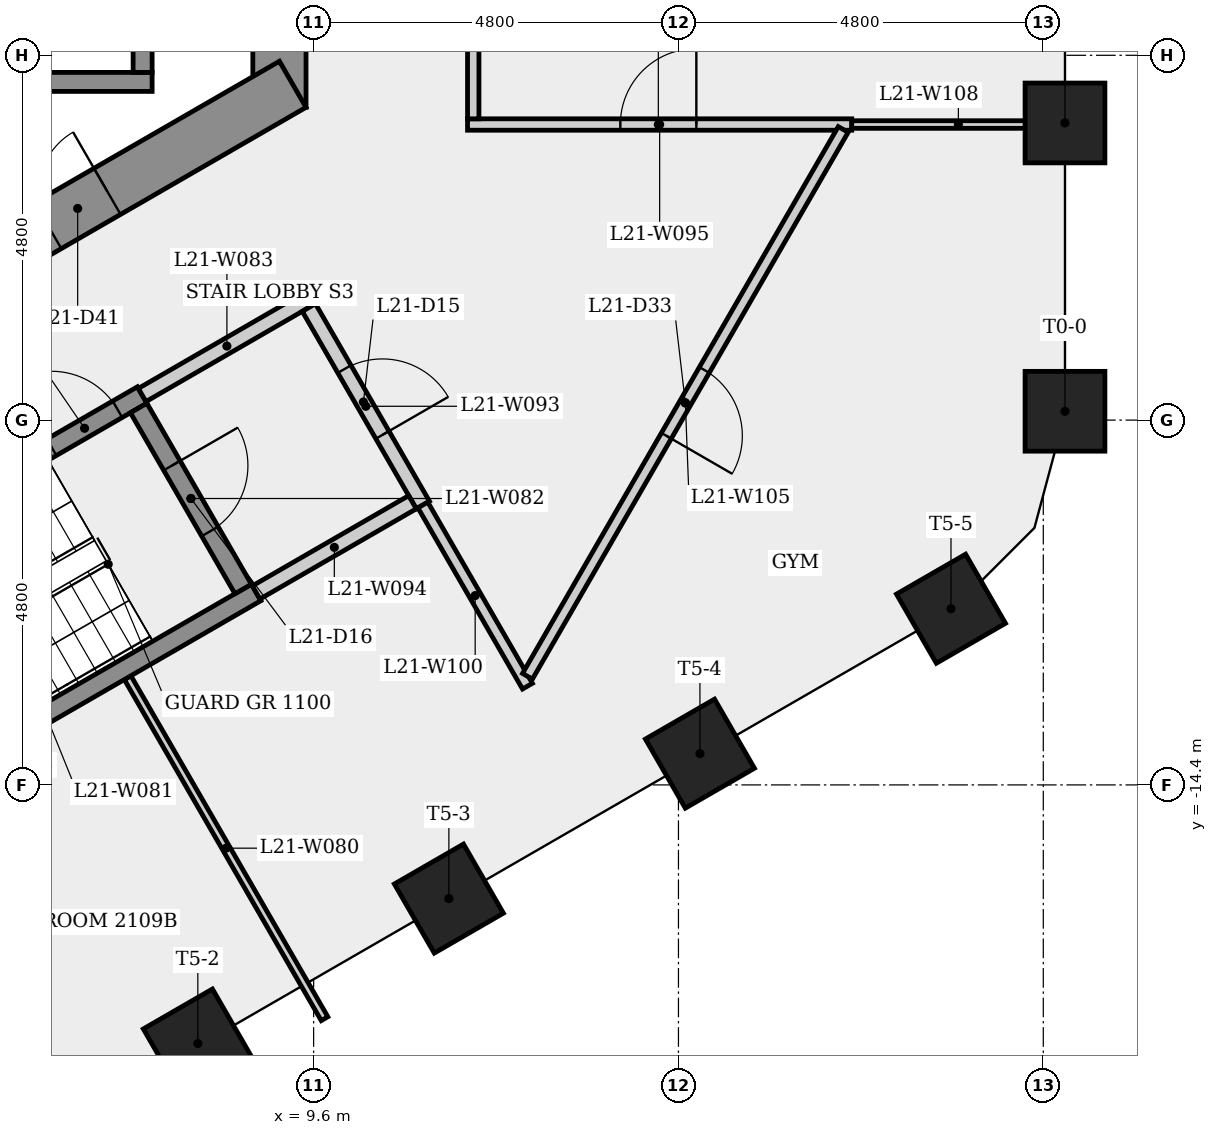
"""IFC4 building model, lengths in metres.
Left out: names, types, materials, properties, quantities, classifications, styles, units other than length and angle.
Written with IfcOpenShell. Run it as: python <this file> out.ifc"""

import sys

from ifc_helpers import new_model, si_unit, direction, frame, frame_2d, origin, origin_2d, place, context, subcontext, project, spatial, rectangle, extrude, element, fill, save


model = new_model("IFC4")
c1 = context("Model", 3, precision=1e-05, world=origin(), true_north=direction((0.0, 1.0)))
c2 = subcontext(c1, "Body", "Model", "MODEL_VIEW")
j1 = project(units=[si_unit("LENGTHUNIT", "METRE"), si_unit("PLANEANGLEUNIT", "RADIAN")], contexts=[c1])
p1 = place(None, origin())
s1 = spatial("IfcSite", under=j1, at=p1, CompositionType="ELEMENT")
p2 = place(p1, origin())
s2 = spatial("IfcBuilding", under=s1, at=p2, CompositionType="ELEMENT")
p3 = place(p2, frame((0.0, 0.0, 83.1)))
s3 = spatial("IfcBuildingStorey", under=s2, at=p3, CompositionType="ELEMENT", Elevation=83.1)
p4 = place(p3, frame((9.15, -5.485, 0.0), z_axis=(0.0, 0.0, 1.0), x_axis=(0.0, 1.0, 0.0)))
e1 = element("IfcWall", 1, at=p4, inside=s3, PredefinedType="SHEAR", context=c2, shape_type="SweptSolid", body=[
    extrude(rectangle(XDim=10.97, YDim=0.7, at=frame_2d((5.485, 0.0))), origin(), (0.0, 0.0, 1.0), 3.4),
])
p5 = place(p4, frame((4.685, 0.0, 0.0)))
e2 = element("IfcOpeningElement", 2, at=p5, cuts=e1, PredefinedType="OPENING", context=c2, shape_type="SweptSolid", body=[
    extrude(rectangle(XDim=1.6, YDim=2.1, at=frame_2d((0.8, 1.05))), frame((0.0, 0.36, 0.0), z_axis=(0.0, -1.0, 0.0), x_axis=(1.0, 0.0, 0.0)), (0.0, 0.0, 1.0), 0.72),
])
p6 = place(p3, frame((-0.175, -10.667, 0.0), z_axis=(0.0, 0.0, 1.0), x_axis=(0.866023993627, 0.500002442456, 0.0)))
e3 = element("IfcWall", 3, at=p6, inside=s3, PredefinedType="SHEAR", context=c2, shape_type="SweptSolid", body=[
    extrude(rectangle(XDim=10.97, YDim=0.7, at=frame_2d((5.485, 0.0))), origin(), (0.0, 0.0, 1.0), 3.4),
])
p7 = place(p6, frame((7.252, 0.0, 0.0)))
e4 = element("IfcOpeningElement", 4, at=p7, cuts=e3, PredefinedType="OPENING", context=c2, shape_type="SweptSolid", body=[
    extrude(rectangle(XDim=0.9, YDim=2.1, at=frame_2d((0.45, 1.05))), frame((0.0, 0.36, 0.0), z_axis=(0.0, -1.0, 0.0), x_axis=(1.0, 0.0, 0.0)), (0.0, 0.0, 1.0), 0.72),
])
for number, where, z_axis, x_axis in (
    (5, (19.486, -9.484, 0.0), (0.0, 0.0, 1.0), (1.0, 0.0, 0.0)),
    (6, (19.486, -5.69, 0.0), (0.0, 0.0, 1.0), (1.0, 0.0, 0.0)),
    (7, (8.076, -17.803, 0.0), (0.0, 0.0, 1.0), (0.5, -0.866, 0.0)),
    (8, (11.379, -15.896, 0.0), (0.0, 0.0, 1.0), (0.5, -0.866, 0.0)),
    (9, (14.683, -13.989, 0.0), (0.0, 0.0, 1.0), (0.5, -0.866, 0.0)),
    (10, (17.986, -12.082, 0.0), (0.0, 0.0, 1.0), (0.5, -0.866, 0.0)),
):
    element("IfcColumn", number, at=place(p3, frame(where, z_axis=z_axis, x_axis=x_axis)), inside=s3, PredefinedType="COLUMN", context=c2, shape_type="SweptSolid", body=[
        extrude(rectangle(XDim=1.05, YDim=1.05, at=origin_2d()), origin(), (0.0, 0.0, 1.0), 3.4),
    ])
p8 = place(p3, frame((-7.225, -5.15, 0.0), z_axis=(0.0, 0.0, 1.0), x_axis=(1.0, 0.0, 0.0)))
e11 = element("IfcWall", 11, at=p8, inside=s3, PredefinedType="SHEAR", context=c2, shape_type="SweptSolid", body=[
    extrude(rectangle(XDim=14.7, YDim=0.25, at=frame_2d((7.35, 0.0))), origin(), (0.0, 0.0, 1.0), 3.05),
])
p9 = place(p3, frame((1.585, -12.595, 0.0), z_axis=(0.0, 0.0, 1.0), x_axis=(0.866036417653, 0.499980922934, 0.0)))
e12 = element("IfcWall", 12, at=p9, inside=s3, PredefinedType="SHEAR", context=c2, shape_type="SweptSolid", body=[
    extrude(rectangle(XDim=6.65, YDim=0.25, at=frame_2d((3.325, 0.0))), origin(), (0.0, 0.0, 1.0), 3.05),
])
p10 = place(p9, frame((5.275, 0.0, 0.0)))
e13 = element("IfcOpeningElement", 13, at=p10, cuts=e12, PredefinedType="OPENING", context=c2, shape_type="SweptSolid", body=[
    extrude(rectangle(XDim=1.0, YDim=2.1, at=frame_2d((0.5, 1.05))), frame((0.0, 0.135, 0.0), z_axis=(0.0, -1.0, 0.0), x_axis=(1.0, 0.0, 0.0)), (0.0, 0.0, 1.0), 0.27),
])
p11 = place(p3, frame((7.153, -12.989, 0.0), z_axis=(0.0, 0.0, 1.0), x_axis=(0.499990271856, -0.866031020258, 0.0)))
e14 = element("IfcWall", 14, at=p11, inside=s3, PredefinedType="PARTITIONING", context=c2, shape_type="SweptSolid", body=[
    extrude(rectangle(XDim=5.182, YDim=0.1, at=frame_2d((2.591, 0.0))), origin(), (0.0, 0.0, 1.0), 3.05),
])
p12 = place(p3, frame((3.301, -15.068, 0.0), z_axis=(0.0, 0.0, 1.0), x_axis=(0.866035036182, 0.499983315828, 0.0)))
e15 = element("IfcWall", 15, at=p12, inside=s3, PredefinedType="SHEAR", context=c2, shape_type="SweptSolid", body=[
    extrude(rectangle(XDim=6.4, YDim=0.25, at=frame_2d((3.2, 0.0))), origin(), (0.0, 0.0, 1.0), 3.05),
])
p13 = place(p3, frame((7.298, -9.441, 0.0), z_axis=(0.0, 0.0, 1.0), x_axis=(0.500034990121, -0.866005201286, 0.0)))
e16 = element("IfcWall", 16, at=p13, inside=s3, PredefinedType="SHEAR", context=c2, shape_type="SweptSolid", body=[
    extrude(rectangle(XDim=2.75, YDim=0.25, at=frame_2d((1.375, 0.0))), origin(), (0.0, 0.0, 1.0), 3.05),
])
p14 = place(p13, frame((0.875, 0.0, 0.0)))
e17 = element("IfcOpeningElement", 17, at=p14, cuts=e16, PredefinedType="OPENING", context=c2, shape_type="SweptSolid", body=[
    extrude(rectangle(XDim=1.0, YDim=2.1, at=frame_2d((0.5, 1.05))), frame((0.0, 0.135, 0.0), z_axis=(0.0, -1.0, 0.0), x_axis=(1.0, 0.0, 0.0)), (0.0, 0.0, 1.0), 0.27),
])
p15 = place(p3, frame((7.344, -9.27, 0.0), z_axis=(0.0, 0.0, 1.0), x_axis=(0.866005588531, 0.500034319456, 0.0)))
e18 = element("IfcWall", 18, at=p15, inside=s3, PredefinedType="PARTITIONING", context=c2, shape_type="SweptSolid", body=[
    extrude(rectangle(XDim=2.575, YDim=0.2, at=frame_2d((1.288, 0.0))), origin(), (0.0, 0.0, 1.0), 3.05),
])
p16 = place(p3, frame((7.35, -1.925, 0.0), z_axis=(0.0, 0.0, 1.0), x_axis=(0.0, -1.0, 0.0)))
e19 = element("IfcWall", 19, at=p16, inside=s3, PredefinedType="SHEAR", context=c2, shape_type="SweptSolid", body=[
    extrude(rectangle(XDim=3.1, YDim=0.25, at=frame_2d((1.55, 0.0))), origin(), (0.0, 0.0, 1.0), 3.4),
])
p17 = place(p3, frame((9.537, -8.119, 0.0), z_axis=(0.0, 0.0, 1.0), x_axis=(0.499990139034, -0.866031096941, 0.0)))
e20 = element("IfcWall", 20, at=p17, inside=s3, PredefinedType="PARTITIONING", context=c2, shape_type="SweptSolid", body=[
    extrude(rectangle(XDim=3.0, YDim=0.2, at=frame_2d((1.5, 0.0))), origin(), (0.0, 0.0, 1.0), 3.05),
])
p18 = place(p17, frame((0.935, 0.0, 0.0)))
e21 = element("IfcOpeningElement", 21, at=p18, cuts=e20, PredefinedType="OPENING", context=c2, shape_type="SweptSolid", body=[
    extrude(rectangle(XDim=1.0, YDim=2.1, at=frame_2d((0.5, 1.05))), frame((0.0, 0.11, 0.0), z_axis=(0.0, -1.0, 0.0), x_axis=(1.0, 0.0, 0.0)), (0.0, 0.0, 1.0), 0.22),
])
p19 = place(p3, frame((10.901, -10.681, 0.0), z_axis=(0.0, 0.0, 1.0), x_axis=(-0.866007538022, -0.500030943131, 0.0)))
e22 = element("IfcWall", 22, at=p19, inside=s3, PredefinedType="PARTITIONING", context=c2, shape_type="SweptSolid", body=[
    extrude(rectangle(XDim=2.375, YDim=0.2, at=frame_2d((1.188, 0.0))), origin(), (0.0, 0.0, 1.0), 3.05),
])
p20 = place(p3, frame((11.625, -5.711, 0.0), z_axis=(0.0, 0.0, 1.0), x_axis=(1.0, 0.0, 0.0)))
e23 = element("IfcWall", 23, at=p20, inside=s3, PredefinedType="PARTITIONING", context=c2, shape_type="SweptSolid", body=[
    extrude(rectangle(XDim=5.055, YDim=0.15, at=frame_2d((2.528, 0.0))), origin(), (0.0, 0.0, 1.0), 3.05),
])
p21 = place(p20, frame((2.01, 0.0, 0.0)))
e24 = element("IfcOpeningElement", 24, at=p21, cuts=e23, PredefinedType="OPENING", context=c2, shape_type="SweptSolid", body=[
    extrude(rectangle(XDim=1.0, YDim=2.1, at=frame_2d((0.5, 1.05))), frame((0.0, 0.085, 0.0), z_axis=(0.0, -1.0, 0.0), x_axis=(1.0, 0.0, 0.0)), (0.0, 0.0, 1.0), 0.17),
])
p22 = place(p3, frame((11.7, -5.636, 0.0), z_axis=(0.0, 0.0, 1.0), x_axis=(0.0, 1.0, 0.0)))
e25 = element("IfcWall", 25, at=p22, inside=s3, PredefinedType="PARTITIONING", context=c2, shape_type="SweptSolid", body=[
    extrude(rectangle(XDim=11.422, YDim=0.15, at=frame_2d((5.711, 0.0))), origin(), (0.0, 0.0, 1.0), 3.05),
])
p23 = place(p22, frame((5.136, 0.0, 0.0)))
e26 = element("IfcOpeningElement", 26, at=p23, cuts=e25, PredefinedType="OPENING", context=c2, shape_type="SweptSolid", body=[
    extrude(rectangle(XDim=1.0, YDim=2.1, at=frame_2d((0.5, 1.05))), frame((0.0, 0.085, 0.0), z_axis=(0.0, -1.0, 0.0), x_axis=(1.0, 0.0, 0.0)), (0.0, 0.0, 1.0), 0.17),
])
p24 = place(p3, frame((12.414, -13.101, 0.0), z_axis=(0.0, 0.0, 1.0), x_axis=(-0.499983500429, 0.866034929606, 0.0)))
e27 = element("IfcWall", 27, at=p24, inside=s3, PredefinedType="PARTITIONING", context=c2, shape_type="SweptSolid", body=[
    extrude(rectangle(XDim=2.752, YDim=0.15, at=frame_2d((1.376, 0.0))), origin(), (0.0, 0.0, 1.0), 3.05),
])
p25 = place(p3, frame((16.568, -5.776, 0.0), z_axis=(0.0, 0.0, 1.0), x_axis=(-0.499985297152, -0.866033892311, 0.0)))
e28 = element("IfcWall", 28, at=p25, inside=s3, PredefinedType="PARTITIONING", context=c2, shape_type="SweptSolid", body=[
    extrude(rectangle(XDim=8.308, YDim=0.15, at=frame_2d((4.154, 0.0))), origin(), (0.0, 0.0, 1.0), 3.05),
])
p26 = place(p25, frame((3.654, 0.0, 0.0)))
e29 = element("IfcOpeningElement", 29, at=p26, cuts=e28, PredefinedType="OPENING", context=c2, shape_type="SweptSolid", body=[
    extrude(rectangle(XDim=1.0, YDim=2.1, at=frame_2d((0.5, 1.05))), frame((0.0, 0.085, 0.0), z_axis=(0.0, -1.0, 0.0), x_axis=(1.0, 0.0, 0.0)), (0.0, 0.0, 1.0), 0.17),
])
p27 = place(p3, frame((19.486, -5.711, 0.0), z_axis=(0.0, 0.0, 1.0), x_axis=(-1.0, 0.0, 0.0)))
e30 = element("IfcWall", 30, at=p27, inside=s3, PredefinedType="PARTITIONING", context=c2, shape_type="SweptSolid", body=[
    extrude(rectangle(XDim=2.805, YDim=0.1, at=frame_2d((1.403, 0.0))), origin(), (0.0, 0.0, 1.0), 3.05),
])
p28 = place(p10, origin())
e31 = element("IfcDoor", 31, at=p28, inside=s3, OperationType="SINGLE_SWING_LEFT", PredefinedType="DOOR", context=c2, shape_type="SweptSolid", body=[
    extrude(rectangle(XDim=1.0, YDim=2.1, at=frame_2d((0.5, 1.05))), frame((0.0, 0.025, 0.0), z_axis=(0.0, -1.0, 0.0), x_axis=(1.0, 0.0, 0.0)), (0.0, 0.0, 1.0), 0.05),
])
fill(e13, e31)
p29 = place(p18, origin())
e32 = element("IfcDoor", 32, at=p29, inside=s3, OperationType="SINGLE_SWING_RIGHT", PredefinedType="DOOR", context=c2, shape_type="SweptSolid", body=[
    extrude(rectangle(XDim=1.0, YDim=2.1, at=frame_2d((0.5, 1.05))), frame((0.0, 0.025, 0.0), z_axis=(0.0, -1.0, 0.0), x_axis=(1.0, 0.0, 0.0)), (0.0, 0.0, 1.0), 0.05),
])
fill(e21, e32)
p30 = place(p14, origin())
e33 = element("IfcDoor", 33, at=p30, inside=s3, OperationType="SINGLE_SWING_LEFT", PredefinedType="DOOR", context=c2, shape_type="SweptSolid", body=[
    extrude(rectangle(XDim=1.0, YDim=2.1, at=frame_2d((0.5, 1.05))), frame((0.0, 0.025, 0.0), z_axis=(0.0, -1.0, 0.0), x_axis=(1.0, 0.0, 0.0)), (0.0, 0.0, 1.0), 0.05),
])
fill(e17, e33)
p31 = place(p21, origin())
e34 = element("IfcDoor", 34, at=p31, inside=s3, OperationType="SINGLE_SWING_RIGHT", PredefinedType="DOOR", context=c2, shape_type="SweptSolid", body=[
    extrude(rectangle(XDim=1.0, YDim=2.1, at=frame_2d((0.5, 1.05))), frame((0.0, 0.025, 0.0), z_axis=(0.0, -1.0, 0.0), x_axis=(1.0, 0.0, 0.0)), (0.0, 0.0, 1.0), 0.05),
])
fill(e24, e34)
p32 = place(p26, origin())
e35 = element("IfcDoor", 35, at=p32, inside=s3, OperationType="SINGLE_SWING_RIGHT", PredefinedType="DOOR", context=c2, shape_type="SweptSolid", body=[
    extrude(rectangle(XDim=1.0, YDim=2.1, at=frame_2d((0.5, 1.05))), frame((0.0, 0.025, 0.0), z_axis=(0.0, -1.0, 0.0), x_axis=(1.0, 0.0, 0.0)), (0.0, 0.0, 1.0), 0.05),
])
fill(e29, e35)
p33 = place(p7, origin())
e36 = element("IfcDoor", 36, at=p33, inside=s3, OperationType="SINGLE_SWING_RIGHT", PredefinedType="DOOR", context=c2, shape_type="SweptSolid", body=[
    extrude(rectangle(XDim=0.9, YDim=2.1, at=frame_2d((0.45, 1.05))), frame((0.0, 0.025, 0.0), z_axis=(0.0, -1.0, 0.0), x_axis=(1.0, 0.0, 0.0)), (0.0, 0.0, 1.0), 0.05),
])
fill(e4, e36)
save(model, sys.argv[1])
